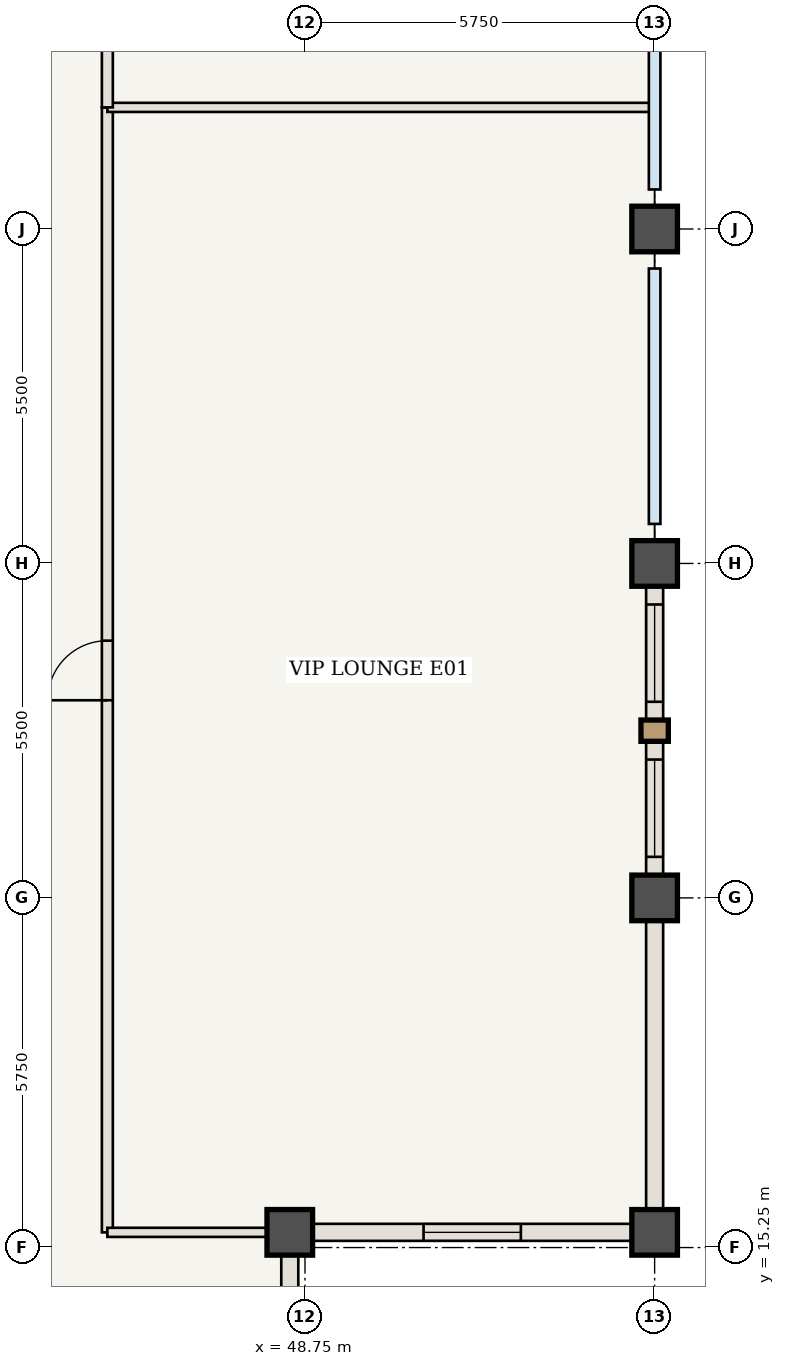
"""IFC4 building model, lengths in metres.
Left out: names, types, materials, properties, quantities, classifications, styles, units other than length and angle.
Written with IfcOpenShell. Run it as: python <this file> out.ifc"""

import sys

from ifc_helpers import new_model, si_unit, direction, frame, frame_2d, origin, origin_2d, place, context, subcontext, project, spatial, rectangle, extrude, element, fill, save


model = new_model("IFC4")
c1 = context("Model", 3, precision=1e-05, world=origin(), true_north=direction((0.0, 1.0)))
c2 = subcontext(c1, "Body", "Model", "MODEL_VIEW")
j1 = project(units=[si_unit("LENGTHUNIT", "METRE"), si_unit("PLANEANGLEUNIT", "RADIAN")], contexts=[c1])
p1 = place(None, origin())
s1 = spatial("IfcSite", under=j1, at=p1, CompositionType="ELEMENT")
p2 = place(p1, origin())
s2 = spatial("IfcBuilding", under=s1, at=p2, CompositionType="ELEMENT")
p3 = place(p2, frame((0.0, 0.0, 308.35)))
s3 = spatial("IfcBuildingStorey", under=s2, at=p3, CompositionType="ELEMENT", Elevation=308.35)
for number, where, z_axis, x_axis in (
    (1, (48.5, 15.5, 0.0), (0.0, 0.0, 1.0), (1.0, 0.0, 0.0)),
    (2, (54.5, 15.5, 0.0), (0.0, 0.0, 1.0), (1.0, 0.0, 0.0)),
    (3, (54.5, 21.0, 0.0), (0.0, 0.0, 1.0), (1.0, 0.0, 0.0)),
    (4, (54.5, 26.5, 0.0), (0.0, 0.0, 1.0), (1.0, 0.0, 0.0)),
    (5, (54.5, 32.0, 0.0), (0.0, 0.0, 1.0), (1.0, 0.0, 0.0)),
):
    element("IfcColumn", number, at=place(p3, frame(where, z_axis=z_axis, x_axis=x_axis)), inside=s3, PredefinedType="COLUMN", context=c2, shape_type="SweptSolid", body=[
        extrude(rectangle(XDim=0.75, YDim=0.75, at=origin_2d()), origin(), (0.0, 0.0, 1.0), 4.9),
    ])
p4 = place(p3, frame((45.5, 15.5, 0.0), z_axis=(0.0, 0.0, 1.0), x_axis=(0.0, 1.0, 0.0)))
e6 = element("IfcWall", 6, at=p4, inside=s3, PredefinedType="STANDARD", context=c2, shape_type="SweptSolid", body=[
    extrude(rectangle(XDim=18.5, YDim=0.18, at=frame_2d((9.25, 0.0))), origin(), (0.0, 0.0, 1.0), 4.64),
])
p5 = place(p4, frame((8.75, 0.0, 0.0)))
e7 = element("IfcOpeningElement", 7, at=p5, cuts=e6, PredefinedType="OPENING", context=c2, shape_type="SweptSolid", body=[
    extrude(rectangle(XDim=0.98, YDim=2.2, at=frame_2d((0.49, 1.1))), frame((0.0, 0.1, 0.0), z_axis=(0.0, -1.0, 0.0), x_axis=(1.0, 0.0, 0.0)), (0.0, 0.0, 1.0), 0.2),
])
p6 = place(p3, frame((45.5, 34.0, 0.0), z_axis=(0.0, 0.0, 1.0), x_axis=(1.0, 0.0, 0.0)))
e8 = element("IfcWall", 8, at=p6, inside=s3, PredefinedType="STANDARD", context=c2, shape_type="SweptSolid", body=[
    extrude(rectangle(XDim=8.94, YDim=0.15, at=frame_2d((4.47, 0.0))), origin(), (0.0, 0.0, 1.0), 4.64),
])
p7 = place(p3, frame((45.5, 34.0, 0.0), z_axis=(0.0, 0.0, 1.0), x_axis=(0.0, 1.0, 0.0)))
e9 = element("IfcWall", 9, at=p7, inside=s3, PredefinedType="STANDARD", context=c2, shape_type="SweptSolid", body=[
    extrude(rectangle(XDim=14.5, YDim=0.18, at=frame_2d((7.25, 0.0))), origin(), (0.0, 0.0, 1.0), 4.64),
])
p8 = place(p7, frame((6.75, 0.0, 0.0)))
e10 = element("IfcOpeningElement", 10, at=p8, cuts=e9, PredefinedType="OPENING", context=c2, shape_type="SweptSolid", body=[
    extrude(rectangle(XDim=0.98, YDim=2.2, at=frame_2d((0.49, 1.1))), frame((0.0, 0.1, 0.0), z_axis=(0.0, -1.0, 0.0), x_axis=(1.0, 0.0, 0.0)), (0.0, 0.0, 1.0), 0.2),
])
p9 = place(p3, frame((45.5, 15.5, 0.0), z_axis=(0.0, 0.0, 1.0), x_axis=(1.0, 0.0, 0.0)))
e11 = element("IfcWall", 11, at=p9, inside=s3, PredefinedType="STANDARD", context=c2, shape_type="SweptSolid", body=[
    extrude(rectangle(XDim=3.0, YDim=0.15, at=frame_2d((1.5, 0.0))), origin(), (0.0, 0.0, 1.0), 4.64),
])
p10 = place(p3, frame((54.5, 21.0, 0.0), z_axis=(0.0, 0.0, 1.0), x_axis=(0.0, -1.0, 0.0)))
e12 = element("IfcWall", 12, at=p10, inside=s3, PredefinedType="USERDEFINED", context=c2, shape_type="SweptSolid", body=[
    extrude(rectangle(XDim=5.5, YDim=0.28, at=frame_2d((2.75, 0.0))), origin(), (0.0, 0.0, 1.0), 3.94),
])
p11 = place(p3, frame((54.5, 26.5, 0.0), z_axis=(0.0, 0.0, 1.0), x_axis=(0.0, -1.0, 0.0)))
e13 = element("IfcWall", 13, at=p11, inside=s3, PredefinedType="USERDEFINED", context=c2, shape_type="SweptSolid", body=[
    extrude(rectangle(XDim=5.5, YDim=0.28, at=frame_2d((2.75, 0.0))), origin(), (0.0, 0.0, 1.0), 3.94),
])
p12 = place(p11, frame((0.675, 0.0, 0.85)))
e14 = element("IfcOpeningElement", 14, at=p12, cuts=e13, PredefinedType="OPENING", context=c2, shape_type="SweptSolid", body=[
    extrude(rectangle(XDim=1.6, YDim=2.15, at=frame_2d((0.8, 1.075))), frame((0.0, 0.15, 0.0), z_axis=(0.0, -1.0, 0.0), x_axis=(1.0, 0.0, 0.0)), (0.0, 0.0, 1.0), 0.3),
])
p13 = place(p11, frame((3.225, 0.0, 0.85)))
e15 = element("IfcOpeningElement", 15, at=p13, cuts=e13, PredefinedType="OPENING", context=c2, shape_type="SweptSolid", body=[
    extrude(rectangle(XDim=1.6, YDim=2.15, at=frame_2d((0.8, 1.075))), frame((0.0, 0.15, 0.0), z_axis=(0.0, -1.0, 0.0), x_axis=(1.0, 0.0, 0.0)), (0.0, 0.0, 1.0), 0.3),
])
p14 = place(p3, frame((48.5, 15.5, 0.0), z_axis=(0.0, 0.0, 1.0), x_axis=(0.0, -1.0, 0.0)))
e16 = element("IfcWall", 16, at=p14, inside=s3, PredefinedType="USERDEFINED", context=c2, shape_type="SweptSolid", body=[
    extrude(rectangle(XDim=6.0, YDim=0.28, at=frame_2d((3.0, 0.0))), origin(), (0.0, 0.0, 1.0), 3.94),
])
p15 = place(p14, frame((2.2, 0.0, 0.85)))
e17 = element("IfcOpeningElement", 17, at=p15, cuts=e16, PredefinedType="OPENING", context=c2, shape_type="SweptSolid", body=[
    extrude(rectangle(XDim=1.6, YDim=2.05, at=frame_2d((0.8, 1.025))), frame((0.0, 0.15, 0.0), z_axis=(0.0, -1.0, 0.0), x_axis=(1.0, 0.0, 0.0)), (0.0, 0.0, 1.0), 0.3),
])
p16 = place(p3, frame((54.5, 15.5, 0.0), z_axis=(0.0, 0.0, 1.0), x_axis=(-1.0, 0.0, 0.0)))
e18 = element("IfcWall", 18, at=p16, inside=s3, PredefinedType="USERDEFINED", context=c2, shape_type="SweptSolid", body=[
    extrude(rectangle(XDim=6.0, YDim=0.28, at=frame_2d((3.0, 0.0))), origin(), (0.0, 0.0, 1.0), 3.94),
])
p17 = place(p16, frame((2.2, 0.0, 0.85)))
e19 = element("IfcOpeningElement", 19, at=p17, cuts=e18, PredefinedType="OPENING", context=c2, shape_type="SweptSolid", body=[
    extrude(rectangle(XDim=1.6, YDim=2.05, at=frame_2d((0.8, 1.025))), frame((0.0, 0.15, 0.0), z_axis=(0.0, -1.0, 0.0), x_axis=(1.0, 0.0, 0.0)), (0.0, 0.0, 1.0), 0.3),
])
p18 = place(p5, origin())
e20 = element("IfcDoor", 20, at=p18, inside=s3, OperationType="SINGLE_SWING_LEFT", PredefinedType="DOOR", context=c2, shape_type="SweptSolid", body=[
    extrude(rectangle(XDim=0.98, YDim=2.2, at=frame_2d((0.49, 1.1))), frame((0.0, 0.025, 0.0), z_axis=(0.0, -1.0, 0.0), x_axis=(1.0, 0.0, 0.0)), (0.0, 0.0, 1.0), 0.05),
])
fill(e7, e20)
p19 = place(p12, origin())
e21 = element("IfcWindow", 21, at=p19, inside=s3, PartitioningType="SINGLE_PANEL", PredefinedType="WINDOW", context=c2, shape_type="SweptSolid", body=[
    extrude(rectangle(XDim=1.6, YDim=2.15, at=frame_2d((0.8, 1.075))), frame((0.0, 0.03, 0.0), z_axis=(0.0, -1.0, 0.0), x_axis=(1.0, 0.0, 0.0)), (0.0, 0.0, 1.0), 0.06),
])
fill(e14, e21)
p20 = place(p13, origin())
e22 = element("IfcWindow", 22, at=p20, inside=s3, PartitioningType="SINGLE_PANEL", PredefinedType="WINDOW", context=c2, shape_type="SweptSolid", body=[
    extrude(rectangle(XDim=1.6, YDim=2.15, at=frame_2d((0.8, 1.075))), frame((0.0, 0.03, 0.0), z_axis=(0.0, -1.0, 0.0), x_axis=(1.0, 0.0, 0.0)), (0.0, 0.0, 1.0), 0.06),
])
fill(e15, e22)
p21 = place(p17, origin())
e23 = element("IfcWindow", 23, at=p21, inside=s3, PartitioningType="SINGLE_PANEL", PredefinedType="WINDOW", context=c2, shape_type="SweptSolid", body=[
    extrude(rectangle(XDim=1.6, YDim=2.05, at=frame_2d((0.8, 1.025))), frame((0.0, 0.03, 0.0), z_axis=(0.0, -1.0, 0.0), x_axis=(1.0, 0.0, 0.0)), (0.0, 0.0, 1.0), 0.06),
])
fill(e19, e23)
save(model, sys.argv[1])
